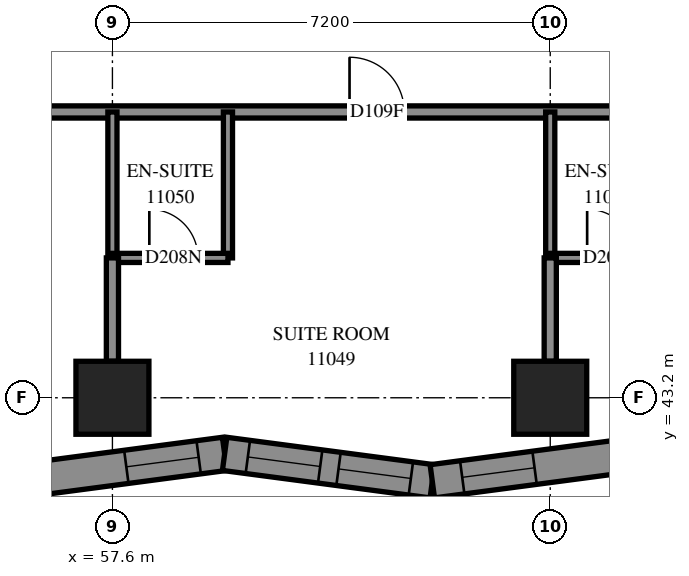
"""IFC4 building model, lengths in metres.
Left out: names, types, materials, properties, quantities, classifications, styles, units other than length and angle.
Written with IfcOpenShell. Run it as: python <this file> out.ifc"""

import sys

from ifc_helpers import new_model, si_unit, direction, frame, frame_2d, origin, origin_2d, place, context, subcontext, project, spatial, polyline, rectangle, outline, extrude, element, fill, save


model = new_model("IFC4")
c1 = context("Model", 3, precision=1e-05, world=origin(), true_north=direction((0.0, 1.0)))
c2 = subcontext(c1, "Body", "Model", "MODEL_VIEW")
j1 = project(units=[si_unit("LENGTHUNIT", "METRE"), si_unit("PLANEANGLEUNIT", "RADIAN")], contexts=[c1])
p1 = place(None, origin())
s1 = spatial("IfcSite", under=j1, at=p1, CompositionType="ELEMENT")
p2 = place(p1, origin())
s2 = spatial("IfcBuilding", under=s1, at=p2, CompositionType="ELEMENT")
p3 = place(p2, frame((0.0, 0.0, 44.0)))
s3 = spatial("IfcBuildingStorey", under=s2, at=p3, CompositionType="ELEMENT", Elevation=44.0)
for number, where, z_axis, x_axis in (
    (1, (57.6, 43.2, 0.0), (0.0, 0.0, 1.0), (1.0, 0.0, 0.0)),
    (2, (64.8, 43.2, 0.0), (0.0, 0.0, 1.0), (1.0, 0.0, 0.0)),
):
    element("IfcColumn", number, at=place(p3, frame(where, z_axis=z_axis, x_axis=x_axis)), inside=s3, PredefinedType="COLUMN", context=c2, shape_type="SweptSolid", body=[
        extrude(rectangle(XDim=1.2, YDim=1.2, at=origin_2d()), origin(), (0.0, 0.0, 1.0), 3.1),
    ])
p4 = place(p3, frame((56.03, 41.826, 0.0), z_axis=(0.0, 0.0, 1.0), x_axis=(0.9913924297, 0.1309238341, 0.0)))
e3 = element("IfcWall", 3, at=p4, inside=s3, PredefinedType="SOLIDWALL", context=c2, shape_type="SweptSolid", body=[
    extrude(outline(polyline([(-0.036, -0.275), (3.408, -0.275), (3.481, 0.275), (0.036, 0.275), (-0.036, -0.275)])), origin(), (0.0, 0.0, 1.0), 3.1),
])
p5 = place(p4, frame((1.814, 0.0, 0.5)))
e4 = element("IfcOpeningElement", 4, at=p5, cuts=e3, PredefinedType="OPENING", context=c2, shape_type="SweptSolid", body=[
    extrude(rectangle(XDim=1.2, YDim=2.45, at=frame_2d((0.6, 1.225))), frame((0.0, 0.285, 0.0), z_axis=(0.0, -1.0, 0.0), x_axis=(1.0, 0.0, 0.0)), (0.0, 0.0, 1.0), 0.57),
])
p6 = place(p3, frame((59.445, 42.277, 0.0), z_axis=(0.0, 0.0, 1.0), x_axis=(0.9913924297, -0.1309238341, 0.0)))
e5 = element("IfcWall", 5, at=p6, inside=s3, PredefinedType="SOLIDWALL", context=c2, shape_type="SweptSolid", body=[
    extrude(outline(polyline([(0.036, -0.275), (3.481, -0.275), (3.408, 0.275), (-0.036, 0.275), (0.036, -0.275)])), origin(), (0.0, 0.0, 1.0), 3.1),
])
p7 = place(p6, frame((0.385, 0.0, 0.5)))
e6 = element("IfcOpeningElement", 6, at=p7, cuts=e5, PredefinedType="OPENING", context=c2, shape_type="SweptSolid", body=[
    extrude(rectangle(XDim=1.2, YDim=2.45, at=frame_2d((0.6, 1.225))), frame((0.0, 0.285, 0.0), z_axis=(0.0, -1.0, 0.0), x_axis=(1.0, 0.0, 0.0)), (0.0, 0.0, 1.0), 0.57),
])
p8 = place(p6, frame((1.889, 0.0, 0.5)))
e7 = element("IfcOpeningElement", 7, at=p8, cuts=e5, PredefinedType="OPENING", context=c2, shape_type="SweptSolid", body=[
    extrude(rectangle(XDim=1.2, YDim=2.45, at=frame_2d((0.6, 1.225))), frame((0.0, 0.285, 0.0), z_axis=(0.0, -1.0, 0.0), x_axis=(1.0, 0.0, 0.0)), (0.0, 0.0, 1.0), 0.57),
])
p9 = place(p3, frame((62.86, 41.826, 0.0), z_axis=(0.0, 0.0, 1.0), x_axis=(0.9913924297, 0.1309238341, 0.0)))
e8 = element("IfcWall", 8, at=p9, inside=s3, PredefinedType="SOLIDWALL", context=c2, shape_type="SweptSolid", body=[
    extrude(outline(polyline([(-0.036, -0.275), (3.408, -0.275), (3.481, 0.275), (0.036, 0.275), (-0.036, -0.275)])), origin(), (0.0, 0.0, 1.0), 3.1),
])
p10 = place(p9, frame((0.496, 0.0, 0.5)))
e9 = element("IfcOpeningElement", 9, at=p10, cuts=e8, PredefinedType="OPENING", context=c2, shape_type="SweptSolid", body=[
    extrude(rectangle(XDim=1.2, YDim=2.45, at=frame_2d((0.6, 1.225))), frame((0.0, 0.285, 0.0), z_axis=(0.0, -1.0, 0.0), x_axis=(1.0, 0.0, 0.0)), (0.0, 0.0, 1.0), 0.57),
])
p11 = place(p3, frame((55.1, 47.9, 0.0), z_axis=(0.0, 0.0, 1.0), x_axis=(1.0, 0.0, 0.0)))
e10 = element("IfcWall", 10, at=p11, inside=s3, PredefinedType="PARTITIONING", context=c2, shape_type="SweptSolid", body=[
    extrude(rectangle(XDim=19.204, YDim=0.2, at=frame_2d((9.602, 0.0))), origin(), (0.0, 0.0, 1.0), 3.1),
])
p12 = place(p11, frame((6.399, 0.0, 0.0)))
e11 = element("IfcOpeningElement", 11, at=p12, cuts=e10, PredefinedType="OPENING", context=c2, shape_type="SweptSolid", body=[
    extrude(rectangle(XDim=0.9, YDim=2.1, at=frame_2d((0.45, 1.05))), frame((0.0, 0.11, 0.0), z_axis=(0.0, -1.0, 0.0), x_axis=(1.0, 0.0, 0.0)), (0.0, 0.0, 1.0), 0.22),
])
p13 = place(p11, frame((13.599, 0.0, 0.0)))
e12 = element("IfcOpeningElement", 12, at=p13, cuts=e10, PredefinedType="OPENING", context=c2, shape_type="SweptSolid", body=[
    extrude(rectangle(XDim=0.9, YDim=2.1, at=frame_2d((0.45, 1.05))), frame((0.0, 0.11, 0.0), z_axis=(0.0, -1.0, 0.0), x_axis=(1.0, 0.0, 0.0)), (0.0, 0.0, 1.0), 0.22),
])
for number, where, z_axis, x_axis in (
    (13, (59.5, 45.5, 0.0), (0.0, 0.0, 1.0), (0.0, 1.0, 0.0)),
    (14, (57.6, 45.5, 0.0), (0.0, 0.0, 1.0), (0.0, 1.0, 0.0)),
    (15, (64.8, 45.5, 0.0), (0.0, 0.0, 1.0), (0.0, 1.0, 0.0)),
):
    element("IfcWall", number, at=place(p3, frame(where, z_axis=z_axis, x_axis=x_axis)), inside=s3, PredefinedType="PARTITIONING", context=c2, shape_type="SweptSolid", body=[
        extrude(rectangle(XDim=2.4, YDim=0.15, at=frame_2d((1.2, 0.0))), origin(), (0.0, 0.0, 1.0), 3.1),
    ])
p14 = place(p3, frame((64.8, 45.5, 0.0), z_axis=(0.0, 0.0, 1.0), x_axis=(1.0, 0.0, 0.0)))
e16 = element("IfcWall", 16, at=p14, inside=s3, PredefinedType="PARTITIONING", context=c2, shape_type="SweptSolid", body=[
    extrude(rectangle(XDim=1.9, YDim=0.15, at=frame_2d((0.95, 0.0))), origin(), (0.0, 0.0, 1.0), 3.1),
])
p15 = place(p14, frame((0.607, 0.0, 0.0)))
e17 = element("IfcOpeningElement", 17, at=p15, cuts=e16, PredefinedType="OPENING", context=c2, shape_type="SweptSolid", body=[
    extrude(rectangle(XDim=0.8, YDim=2.1, at=frame_2d((0.4, 1.05))), frame((0.0, 0.085, 0.0), z_axis=(0.0, -1.0, 0.0), x_axis=(1.0, 0.0, 0.0)), (0.0, 0.0, 1.0), 0.17),
])
p16 = place(p3, frame((57.6, 45.5, 0.0), z_axis=(0.0, 0.0, 1.0), x_axis=(1.0, 0.0, 0.0)))
e18 = element("IfcWall", 18, at=p16, inside=s3, PredefinedType="PARTITIONING", context=c2, shape_type="SweptSolid", body=[
    extrude(rectangle(XDim=1.9, YDim=0.15, at=frame_2d((0.95, 0.0))), origin(), (0.0, 0.0, 1.0), 3.1),
])
p17 = place(p16, frame((0.607, 0.0, 0.0)))
e19 = element("IfcOpeningElement", 19, at=p17, cuts=e18, PredefinedType="OPENING", context=c2, shape_type="SweptSolid", body=[
    extrude(rectangle(XDim=0.8, YDim=2.1, at=frame_2d((0.4, 1.05))), frame((0.0, 0.085, 0.0), z_axis=(0.0, -1.0, 0.0), x_axis=(1.0, 0.0, 0.0)), (0.0, 0.0, 1.0), 0.17),
])
for number, where, z_axis, x_axis in (
    (20, (57.6, 43.8, 0.0), (0.0, 0.0, 1.0), (0.0, 1.0, 0.0)),
    (21, (64.8, 43.8, 0.0), (0.0, 0.0, 1.0), (0.0, 1.0, 0.0)),
):
    element("IfcWall", number, at=place(p3, frame(where, z_axis=z_axis, x_axis=x_axis)), inside=s3, PredefinedType="PARTITIONING", context=c2, shape_type="SweptSolid", body=[
        extrude(rectangle(XDim=1.7, YDim=0.2, at=frame_2d((0.85, 0.0))), origin(), (0.0, 0.0, 1.0), 3.1),
    ])
p18 = place(p5, origin())
e22 = element("IfcWindow", 22, at=p18, inside=s3, PartitioningType="SINGLE_PANEL", PredefinedType="WINDOW", context=c2, shape_type="SweptSolid", body=[
    extrude(rectangle(XDim=1.2, YDim=2.45, at=frame_2d((0.6, 1.225))), frame((0.0, 0.155, 0.0), z_axis=(0.0, -1.0, 0.0), x_axis=(1.0, 0.0, 0.0)), (0.0, 0.0, 1.0), 0.06),
])
fill(e4, e22)
p19 = place(p7, origin())
e23 = element("IfcWindow", 23, at=p19, inside=s3, PartitioningType="SINGLE_PANEL", PredefinedType="WINDOW", context=c2, shape_type="SweptSolid", body=[
    extrude(rectangle(XDim=1.2, YDim=2.45, at=frame_2d((0.6, 1.225))), frame((0.0, 0.155, 0.0), z_axis=(0.0, -1.0, 0.0), x_axis=(1.0, 0.0, 0.0)), (0.0, 0.0, 1.0), 0.06),
])
fill(e6, e23)
p20 = place(p8, origin())
e24 = element("IfcWindow", 24, at=p20, inside=s3, PartitioningType="SINGLE_PANEL", PredefinedType="WINDOW", context=c2, shape_type="SweptSolid", body=[
    extrude(rectangle(XDim=1.2, YDim=2.45, at=frame_2d((0.6, 1.225))), frame((0.0, 0.155, 0.0), z_axis=(0.0, -1.0, 0.0), x_axis=(1.0, 0.0, 0.0)), (0.0, 0.0, 1.0), 0.06),
])
fill(e7, e24)
p21 = place(p10, origin())
e25 = element("IfcWindow", 25, at=p21, inside=s3, PartitioningType="SINGLE_PANEL", PredefinedType="WINDOW", context=c2, shape_type="SweptSolid", body=[
    extrude(rectangle(XDim=1.2, YDim=2.45, at=frame_2d((0.6, 1.225))), frame((0.0, 0.155, 0.0), z_axis=(0.0, -1.0, 0.0), x_axis=(1.0, 0.0, 0.0)), (0.0, 0.0, 1.0), 0.06),
])
fill(e9, e25)
p22 = place(p12, origin())
e26 = element("IfcDoor", 26, at=p22, inside=s3, OperationType="SINGLE_SWING_LEFT", PredefinedType="DOOR", context=c2, shape_type="SweptSolid", body=[
    extrude(rectangle(XDim=0.9, YDim=2.1, at=frame_2d((0.45, 1.05))), frame((0.0, 0.025, 0.0), z_axis=(0.0, -1.0, 0.0), x_axis=(1.0, 0.0, 0.0)), (0.0, 0.0, 1.0), 0.05),
])
fill(e11, e26)
p23 = place(p17, origin())
e27 = element("IfcDoor", 27, at=p23, inside=s3, OperationType="SINGLE_SWING_RIGHT", PredefinedType="DOOR", context=c2, shape_type="SweptSolid", body=[
    extrude(rectangle(XDim=0.8, YDim=2.1, at=frame_2d((0.4, 1.05))), frame((0.0, 0.025, 0.0), z_axis=(0.0, -1.0, 0.0), x_axis=(1.0, 0.0, 0.0)), (0.0, 0.0, 1.0), 0.05),
])
fill(e19, e27)
p24 = place(p15, origin())
e28 = element("IfcDoor", 28, at=p24, inside=s3, OperationType="SINGLE_SWING_RIGHT", PredefinedType="DOOR", context=c2, shape_type="SweptSolid", body=[
    extrude(rectangle(XDim=0.8, YDim=2.1, at=frame_2d((0.4, 1.05))), frame((0.0, 0.025, 0.0), z_axis=(0.0, -1.0, 0.0), x_axis=(1.0, 0.0, 0.0)), (0.0, 0.0, 1.0), 0.05),
])
fill(e17, e28)
save(model, sys.argv[1])
